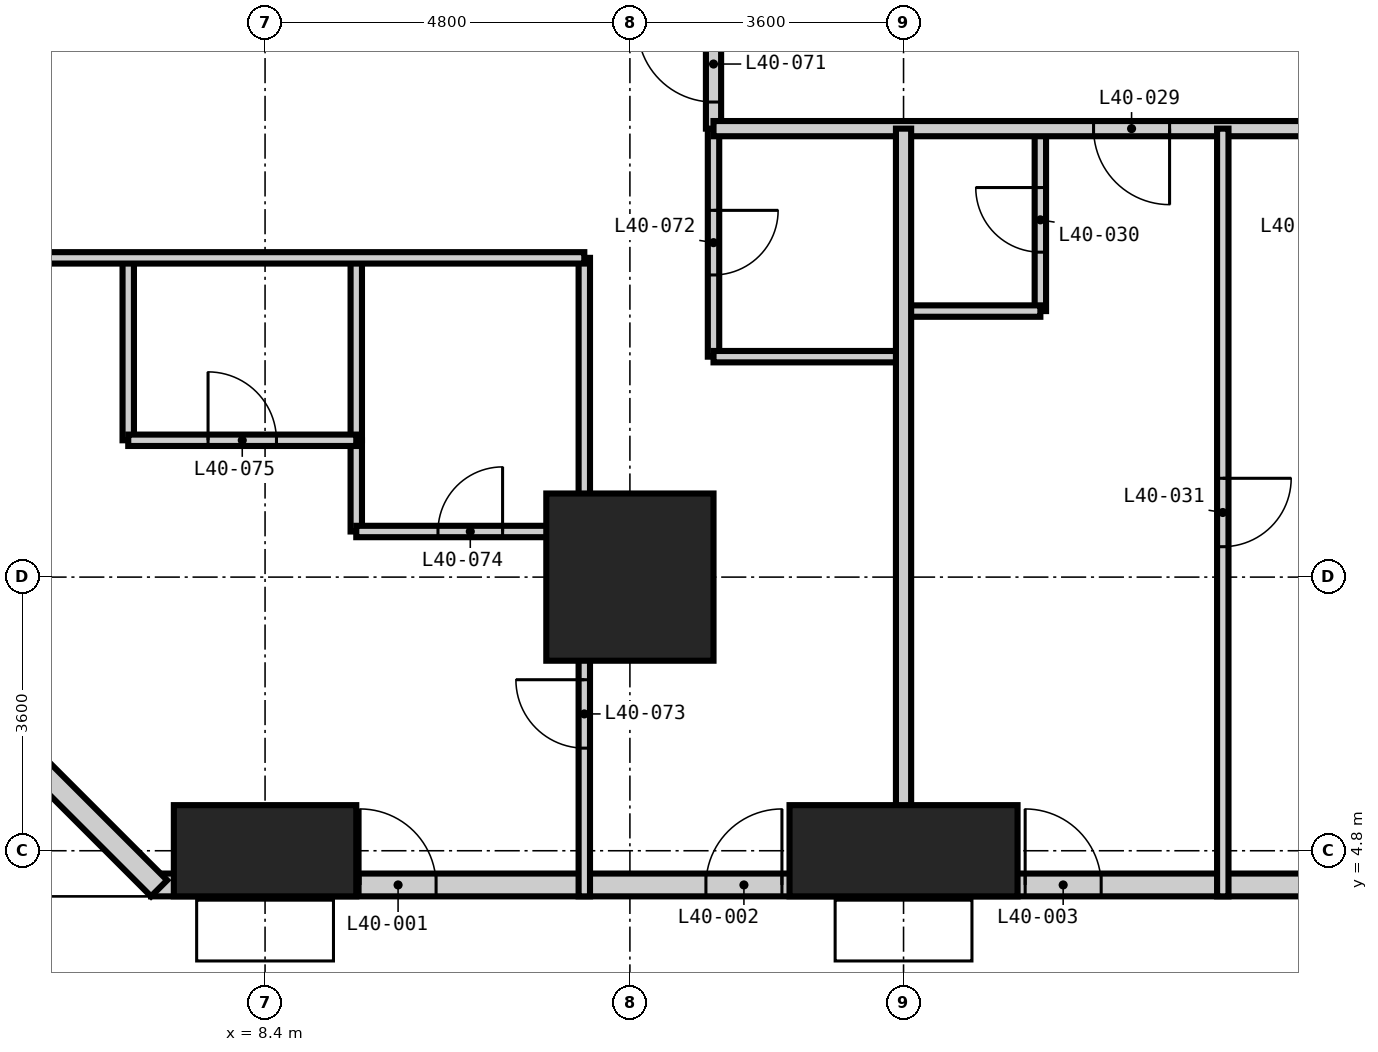
"""IFC4 building model, lengths in metres.
Left out: names, types, materials, properties, quantities, classifications, styles, units other than length and angle.
Written with IfcOpenShell. Run it as: python <this file> out.ifc"""

import sys

from ifc_helpers import new_model, si_unit, direction, frame, frame_2d, origin, origin_2d, place, context, subcontext, project, spatial, rectangle, extrude, element, fill, save


model = new_model("IFC4")
c1 = context("Model", 3, precision=1e-05, world=origin(), true_north=direction((0.0, 1.0)))
c2 = subcontext(c1, "Body", "Model", "MODEL_VIEW")
j1 = project(units=[si_unit("LENGTHUNIT", "METRE"), si_unit("PLANEANGLEUNIT", "RADIAN")], contexts=[c1])
p1 = place(None, origin())
s1 = spatial("IfcSite", under=j1, at=p1, CompositionType="ELEMENT")
p2 = place(p1, origin())
s2 = spatial("IfcBuilding", under=s1, at=p2, CompositionType="ELEMENT")
p3 = place(p2, frame((0.0, 0.0, 159.0)))
s3 = spatial("IfcBuildingStorey", under=s2, at=p3, CompositionType="ELEMENT", Elevation=159.0)
p4 = place(p3, frame((8.4, 4.8, -0.35), z_axis=(0.0, 0.0, 1.0), x_axis=(1.0, 0.0, 0.0)))
e1 = element("IfcColumn", 1, at=p4, inside=s3, PredefinedType="COLUMN", context=c2, shape_type="SweptSolid", body=[
    extrude(rectangle(XDim=2.4, YDim=1.2, at=origin_2d()), origin(), (0.0, 0.0, 1.0), 3.6),
])
p5 = place(p3, frame((13.2, 8.4, -0.35), z_axis=(0.0, 0.0, 1.0), x_axis=(1.0, 0.0, 0.0)))
e2 = element("IfcColumn", 2, at=p5, inside=s3, PredefinedType="COLUMN", context=c2, shape_type="SweptSolid", body=[
    extrude(rectangle(XDim=2.2, YDim=2.2, at=origin_2d()), origin(), (0.0, 0.0, 1.0), 3.6),
])
p6 = place(p3, frame((16.8, 4.8, -0.35), z_axis=(0.0, 0.0, 1.0), x_axis=(1.0, 0.0, 0.0)))
e3 = element("IfcColumn", 3, at=p6, inside=s3, PredefinedType="COLUMN", context=c2, shape_type="SweptSolid", body=[
    extrude(rectangle(XDim=3.0, YDim=1.2, at=origin_2d()), origin(), (0.0, 0.0, 1.0), 3.6),
])
p7 = place(p3, frame((6.9, 4.35, 0.0), z_axis=(0.0, 0.0, 1.0), x_axis=(1.0, 0.0, 0.0)))
e4 = element("IfcWall", 4, at=p7, inside=s3, PredefinedType="SOLIDWALL", context=c2, shape_type="SweptSolid", body=[
    extrude(rectangle(XDim=45.0, YDim=0.3, at=frame_2d((22.5, 0.0))), origin(), (0.0, 0.0, 1.0), 3.25),
])
p8 = place(p7, frame((2.75, 0.0, 0.0)))
e5 = element("IfcOpeningElement", 5, at=p8, cuts=e4, PredefinedType="OPENING", context=c2, shape_type="SweptSolid", body=[
    extrude(rectangle(XDim=1.0, YDim=2.4, at=frame_2d((0.5, 1.2))), frame((0.0, 0.16, 0.0), z_axis=(0.0, -1.0, 0.0), x_axis=(1.0, 0.0, 0.0)), (0.0, 0.0, 1.0), 0.32),
])
p9 = place(p7, frame((7.3, 0.0, 0.0)))
e6 = element("IfcOpeningElement", 6, at=p9, cuts=e4, PredefinedType="OPENING", context=c2, shape_type="SweptSolid", body=[
    extrude(rectangle(XDim=1.0, YDim=2.4, at=frame_2d((0.5, 1.2))), frame((0.0, 0.16, 0.0), z_axis=(0.0, -1.0, 0.0), x_axis=(1.0, 0.0, 0.0)), (0.0, 0.0, 1.0), 0.32),
])
p10 = place(p7, frame((11.5, 0.0, 0.0)))
e7 = element("IfcOpeningElement", 7, at=p10, cuts=e4, PredefinedType="OPENING", context=c2, shape_type="SweptSolid", body=[
    extrude(rectangle(XDim=1.0, YDim=2.4, at=frame_2d((0.5, 1.2))), frame((0.0, 0.16, 0.0), z_axis=(0.0, -1.0, 0.0), x_axis=(1.0, 0.0, 0.0)), (0.0, 0.0, 1.0), 0.32),
])
p11 = place(p7, frame((15.7, 0.0, 0.0)))
e8 = element("IfcOpeningElement", 8, at=p11, cuts=e4, PredefinedType="OPENING", context=c2, shape_type="SweptSolid", body=[
    extrude(rectangle(XDim=1.0, YDim=2.4, at=frame_2d((0.5, 1.2))), frame((0.0, 0.16, 0.0), z_axis=(0.0, -1.0, 0.0), x_axis=(1.0, 0.0, 0.0)), (0.0, 0.0, 1.0), 0.32),
])
p12 = place(p7, frame((19.9, 0.0, 0.0)))
e9 = element("IfcOpeningElement", 9, at=p12, cuts=e4, PredefinedType="OPENING", context=c2, shape_type="SweptSolid", body=[
    extrude(rectangle(XDim=1.0, YDim=2.4, at=frame_2d((0.5, 1.2))), frame((0.0, 0.16, 0.0), z_axis=(0.0, -1.0, 0.0), x_axis=(1.0, 0.0, 0.0)), (0.0, 0.0, 1.0), 0.32),
])
p13 = place(p7, frame((24.1, 0.0, 0.0)))
e10 = element("IfcOpeningElement", 10, at=p13, cuts=e4, PredefinedType="OPENING", context=c2, shape_type="SweptSolid", body=[
    extrude(rectangle(XDim=1.0, YDim=2.4, at=frame_2d((0.5, 1.2))), frame((0.0, 0.16, 0.0), z_axis=(0.0, -1.0, 0.0), x_axis=(1.0, 0.0, 0.0)), (0.0, 0.0, 1.0), 0.32),
])
p14 = place(p7, frame((28.3, 0.0, 0.0)))
e11 = element("IfcOpeningElement", 11, at=p14, cuts=e4, PredefinedType="OPENING", context=c2, shape_type="SweptSolid", body=[
    extrude(rectangle(XDim=1.0, YDim=2.4, at=frame_2d((0.5, 1.2))), frame((0.0, 0.16, 0.0), z_axis=(0.0, -1.0, 0.0), x_axis=(1.0, 0.0, 0.0)), (0.0, 0.0, 1.0), 0.32),
])
p15 = place(p7, frame((32.5, 0.0, 0.0)))
e12 = element("IfcOpeningElement", 12, at=p15, cuts=e4, PredefinedType="OPENING", context=c2, shape_type="SweptSolid", body=[
    extrude(rectangle(XDim=1.0, YDim=2.4, at=frame_2d((0.5, 1.2))), frame((0.0, 0.16, 0.0), z_axis=(0.0, -1.0, 0.0), x_axis=(1.0, 0.0, 0.0)), (0.0, 0.0, 1.0), 0.32),
])
p16 = place(p7, frame((36.7, 0.0, 0.0)))
e13 = element("IfcOpeningElement", 13, at=p16, cuts=e4, PredefinedType="OPENING", context=c2, shape_type="SweptSolid", body=[
    extrude(rectangle(XDim=1.0, YDim=2.4, at=frame_2d((0.5, 1.2))), frame((0.0, 0.16, 0.0), z_axis=(0.0, -1.0, 0.0), x_axis=(1.0, 0.0, 0.0)), (0.0, 0.0, 1.0), 0.32),
])
p17 = place(p7, frame((41.25, 0.0, 0.0)))
e14 = element("IfcOpeningElement", 14, at=p17, cuts=e4, PredefinedType="OPENING", context=c2, shape_type="SweptSolid", body=[
    extrude(rectangle(XDim=1.0, YDim=2.4, at=frame_2d((0.5, 1.2))), frame((0.0, 0.16, 0.0), z_axis=(0.0, -1.0, 0.0), x_axis=(1.0, 0.0, 0.0)), (0.0, 0.0, 1.0), 0.32),
])
p18 = place(p3, frame((4.306, 7.006, 0.0), z_axis=(0.0, 0.0, 1.0), x_axis=(0.707106781187, -0.707106781187, 0.0)))
e15 = element("IfcWall", 15, at=p18, inside=s3, PredefinedType="SOLIDWALL", context=c2, shape_type="SweptSolid", body=[
    extrude(rectangle(XDim=3.819, YDim=0.3, at=frame_2d((1.909, 0.0))), origin(), (0.0, 0.0, 1.0), 3.25),
])
p19 = place(p3, frame((9.6, 9.0, 0.0), z_axis=(0.0, 0.0, 1.0), x_axis=(0.0, 1.0, 0.0)))
e16 = element("IfcWall", 16, at=p19, inside=s3, PredefinedType="PARTITIONING", context=c2, shape_type="SweptSolid", body=[
    extrude(rectangle(XDim=1.2, YDim=0.15, at=frame_2d((0.6, 0.0))), origin(), (0.0, 0.0, 1.0), 3.25),
])
p20 = place(p3, frame((14.3, 11.3, 0.0), z_axis=(0.0, 0.0, 1.0), x_axis=(0.0, 1.0, 0.0)))
e17 = element("IfcWall", 17, at=p20, inside=s3, PredefinedType="PARTITIONING", context=c2, shape_type="SweptSolid", body=[
    extrude(rectangle(XDim=3.0, YDim=0.15, at=frame_2d((1.5, 0.0))), origin(), (0.0, 0.0, 1.0), 3.25),
])
p21 = place(p20, frame((1.075, 0.0, 0.0)))
e18 = element("IfcOpeningElement", 18, at=p21, cuts=e17, PredefinedType="OPENING", context=c2, shape_type="SweptSolid", body=[
    extrude(rectangle(XDim=0.85, YDim=2.1, at=frame_2d((0.425, 1.05))), frame((0.0, 0.085, 0.0), z_axis=(0.0, -1.0, 0.0), x_axis=(1.0, 0.0, 0.0)), (0.0, 0.0, 1.0), 0.17),
])
p22 = place(p3, frame((18.6, 11.9, 0.0), z_axis=(0.0, 0.0, 1.0), x_axis=(0.0, 1.0, 0.0)))
e19 = element("IfcWall", 19, at=p22, inside=s3, PredefinedType="PARTITIONING", context=c2, shape_type="SweptSolid", body=[
    extrude(rectangle(XDim=2.4, YDim=0.15, at=frame_2d((1.2, 0.0))), origin(), (0.0, 0.0, 1.0), 3.25),
])
p23 = place(p22, frame((0.775, 0.0, 0.0)))
e20 = element("IfcOpeningElement", 20, at=p23, cuts=e19, PredefinedType="OPENING", context=c2, shape_type="SweptSolid", body=[
    extrude(rectangle(XDim=0.85, YDim=2.1, at=frame_2d((0.425, 1.05))), frame((0.0, 0.085, 0.0), z_axis=(0.0, -1.0, 0.0), x_axis=(1.0, 0.0, 0.0)), (0.0, 0.0, 1.0), 0.17),
])
p24 = place(p3, frame((9.6, 9.0, 0.0), z_axis=(0.0, 0.0, 1.0), x_axis=(1.0, 0.0, 0.0)))
e21 = element("IfcWall", 21, at=p24, inside=s3, PredefinedType="PARTITIONING", context=c2, shape_type="SweptSolid", body=[
    extrude(rectangle(XDim=3.0, YDim=0.15, at=frame_2d((1.5, 0.0))), origin(), (0.0, 0.0, 1.0), 3.25),
])
p25 = place(p24, frame((1.075, 0.0, 0.0)))
e22 = element("IfcOpeningElement", 22, at=p25, cuts=e21, PredefinedType="OPENING", context=c2, shape_type="SweptSolid", body=[
    extrude(rectangle(XDim=0.85, YDim=2.1, at=frame_2d((0.425, 1.05))), frame((0.0, 0.085, 0.0), z_axis=(0.0, -1.0, 0.0), x_axis=(1.0, 0.0, 0.0)), (0.0, 0.0, 1.0), 0.17),
])
p26 = place(p3, frame((14.3, 11.3, 0.0), z_axis=(0.0, 0.0, 1.0), x_axis=(1.0, 0.0, 0.0)))
e23 = element("IfcWall", 23, at=p26, inside=s3, PredefinedType="PARTITIONING", context=c2, shape_type="SweptSolid", body=[
    extrude(rectangle(XDim=2.5, YDim=0.15, at=frame_2d((1.25, 0.0))), origin(), (0.0, 0.0, 1.0), 3.25),
])
p27 = place(p3, frame((16.8, 11.9, 0.0), z_axis=(0.0, 0.0, 1.0), x_axis=(1.0, 0.0, 0.0)))
e24 = element("IfcWall", 24, at=p27, inside=s3, PredefinedType="PARTITIONING", context=c2, shape_type="SweptSolid", body=[
    extrude(rectangle(XDim=1.8, YDim=0.15, at=frame_2d((0.9, 0.0))), origin(), (0.0, 0.0, 1.0), 3.25),
])
p28 = place(p3, frame((14.3, 14.3, 0.0), z_axis=(0.0, 0.0, 1.0), x_axis=(0.0, 1.0, 0.0)))
e25 = element("IfcWall", 25, at=p28, inside=s3, PredefinedType="PARTITIONING", context=c2, shape_type="SweptSolid", body=[
    extrude(rectangle(XDim=31.4, YDim=0.2, at=frame_2d((15.7, 0.0))), origin(), (0.0, 0.0, 1.0), 3.25),
])
p29 = place(p28, frame((8.3, 0.0, 0.0)))
e26 = element("IfcOpeningElement", 26, at=p29, cuts=e25, PredefinedType="OPENING", context=c2, shape_type="SweptSolid", body=[
    extrude(rectangle(XDim=1.0, YDim=2.2, at=frame_2d((0.5, 1.1))), frame((0.0, 0.11, 0.0), z_axis=(0.0, -1.0, 0.0), x_axis=(1.0, 0.0, 0.0)), (0.0, 0.0, 1.0), 0.22),
])
p30 = place(p28, frame((20.9, 0.0, 0.0)))
e27 = element("IfcOpeningElement", 27, at=p30, cuts=e25, PredefinedType="OPENING", context=c2, shape_type="SweptSolid", body=[
    extrude(rectangle(XDim=1.0, YDim=2.2, at=frame_2d((0.5, 1.1))), frame((0.0, 0.11, 0.0), z_axis=(0.0, -1.0, 0.0), x_axis=(1.0, 0.0, 0.0)), (0.0, 0.0, 1.0), 0.22),
])
p31 = place(p28, frame((0.35, 0.0, 0.0)))
e28 = element("IfcOpeningElement", 28, at=p31, cuts=e25, PredefinedType="OPENING", context=c2, shape_type="SweptSolid", body=[
    extrude(rectangle(XDim=1.0, YDim=2.2, at=frame_2d((0.5, 1.1))), frame((0.0, 0.11, 0.0), z_axis=(0.0, -1.0, 0.0), x_axis=(1.0, 0.0, 0.0)), (0.0, 0.0, 1.0), 0.22),
])
p32 = place(p28, frame((29.05, 0.0, 0.0)))
e29 = element("IfcOpeningElement", 29, at=p32, cuts=e25, PredefinedType="OPENING", context=c2, shape_type="SweptSolid", body=[
    extrude(rectangle(XDim=1.0, YDim=2.2, at=frame_2d((0.5, 1.1))), frame((0.0, 0.11, 0.0), z_axis=(0.0, -1.0, 0.0), x_axis=(1.0, 0.0, 0.0)), (0.0, 0.0, 1.0), 0.22),
])
p33 = place(p3, frame((45.1, 14.3, 0.0), z_axis=(0.0, 0.0, 1.0), x_axis=(-1.0, 0.0, 0.0)))
e30 = element("IfcWall", 30, at=p33, inside=s3, PredefinedType="PARTITIONING", context=c2, shape_type="SweptSolid", body=[
    extrude(rectangle(XDim=30.8, YDim=0.2, at=frame_2d((15.4, 0.0))), origin(), (0.0, 0.0, 1.0), 3.25),
])
p34 = place(p33, frame((24.8, 0.0, 0.0)))
e31 = element("IfcOpeningElement", 31, at=p34, cuts=e30, PredefinedType="OPENING", context=c2, shape_type="SweptSolid", body=[
    extrude(rectangle(XDim=1.0, YDim=2.2, at=frame_2d((0.5, 1.1))), frame((0.0, 0.11, 0.0), z_axis=(0.0, -1.0, 0.0), x_axis=(1.0, 0.0, 0.0)), (0.0, 0.0, 1.0), 0.22),
])
p35 = place(p33, frame((14.0, 0.0, 0.0)))
e32 = element("IfcOpeningElement", 32, at=p35, cuts=e30, PredefinedType="OPENING", context=c2, shape_type="SweptSolid", body=[
    extrude(rectangle(XDim=1.0, YDim=2.2, at=frame_2d((0.5, 1.1))), frame((0.0, 0.11, 0.0), z_axis=(0.0, -1.0, 0.0), x_axis=(1.0, 0.0, 0.0)), (0.0, 0.0, 1.0), 0.22),
])
p36 = place(p33, frame((8.0, 0.0, 0.0)))
e33 = element("IfcOpeningElement", 33, at=p36, cuts=e30, PredefinedType="OPENING", context=c2, shape_type="SweptSolid", body=[
    extrude(rectangle(XDim=1.0, YDim=2.2, at=frame_2d((0.5, 1.1))), frame((0.0, 0.11, 0.0), z_axis=(0.0, -1.0, 0.0), x_axis=(1.0, 0.0, 0.0)), (0.0, 0.0, 1.0), 0.22),
])
p37 = place(p3, frame((16.8, 4.2, 0.0), z_axis=(0.0, 0.0, 1.0), x_axis=(0.0, 1.0, 0.0)))
e34 = element("IfcWall", 34, at=p37, inside=s3, PredefinedType="PARTITIONING", context=c2, shape_type="SweptSolid", body=[
    extrude(rectangle(XDim=10.1, YDim=0.2, at=frame_2d((5.05, 0.0))), origin(), (0.0, 0.0, 1.0), 3.25),
])
for number, where, z_axis, x_axis in (
    (35, (6.6, 10.2, 0.0), (0.0, 0.0, 1.0), (0.0, 1.0, 0.0)),
    (36, (9.6, 10.2, 0.0), (0.0, 0.0, 1.0), (0.0, 1.0, 0.0)),
):
    element("IfcWall", number, at=place(p3, frame(where, z_axis=z_axis, x_axis=x_axis)), inside=s3, PredefinedType="PARTITIONING", context=c2, shape_type="SweptSolid", body=[
        extrude(rectangle(XDim=2.4, YDim=0.15, at=frame_2d((1.2, 0.0))), origin(), (0.0, 0.0, 1.0), 3.25),
    ])
p38 = place(p3, frame((12.6, 4.2, 0.0), z_axis=(0.0, 0.0, 1.0), x_axis=(0.0, 1.0, 0.0)))
e37 = element("IfcWall", 37, at=p38, inside=s3, PredefinedType="PARTITIONING", context=c2, shape_type="SweptSolid", body=[
    extrude(rectangle(XDim=8.4, YDim=0.15, at=frame_2d((4.2, 0.0))), origin(), (0.0, 0.0, 1.0), 3.25),
])
p39 = place(p38, frame((1.95, 0.0, 0.0)))
e38 = element("IfcOpeningElement", 38, at=p39, cuts=e37, PredefinedType="OPENING", context=c2, shape_type="SweptSolid", body=[
    extrude(rectangle(XDim=0.9, YDim=2.1, at=frame_2d((0.45, 1.05))), frame((0.0, 0.085, 0.0), z_axis=(0.0, -1.0, 0.0), x_axis=(1.0, 0.0, 0.0)), (0.0, 0.0, 1.0), 0.17),
])
p40 = place(p3, frame((21.0, 4.2, 0.0), z_axis=(0.0, 0.0, 1.0), x_axis=(0.0, 1.0, 0.0)))
e39 = element("IfcWall", 39, at=p40, inside=s3, PredefinedType="PARTITIONING", context=c2, shape_type="SweptSolid", body=[
    extrude(rectangle(XDim=10.1, YDim=0.15, at=frame_2d((5.05, 0.0))), origin(), (0.0, 0.0, 1.0), 3.25),
])
p41 = place(p40, frame((4.6, 0.0, 0.0)))
e40 = element("IfcOpeningElement", 40, at=p41, cuts=e39, PredefinedType="OPENING", context=c2, shape_type="SweptSolid", body=[
    extrude(rectangle(XDim=0.9, YDim=2.1, at=frame_2d((0.45, 1.05))), frame((0.0, 0.085, 0.0), z_axis=(0.0, -1.0, 0.0), x_axis=(1.0, 0.0, 0.0)), (0.0, 0.0, 1.0), 0.17),
])
p42 = place(p3, frame((6.6, 10.2, 0.0), z_axis=(0.0, 0.0, 1.0), x_axis=(1.0, 0.0, 0.0)))
e41 = element("IfcWall", 41, at=p42, inside=s3, PredefinedType="PARTITIONING", context=c2, shape_type="SweptSolid", body=[
    extrude(rectangle(XDim=3.0, YDim=0.15, at=frame_2d((1.5, 0.0))), origin(), (0.0, 0.0, 1.0), 3.25),
])
p43 = place(p42, frame((1.05, 0.0, 0.0)))
e42 = element("IfcOpeningElement", 42, at=p43, cuts=e41, PredefinedType="OPENING", context=c2, shape_type="SweptSolid", body=[
    extrude(rectangle(XDim=0.9, YDim=2.1, at=frame_2d((0.45, 1.05))), frame((0.0, 0.085, 0.0), z_axis=(0.0, -1.0, 0.0), x_axis=(1.0, 0.0, 0.0)), (0.0, 0.0, 1.0), 0.17),
])
p44 = place(p3, frame((4.2, 12.6, 0.0), z_axis=(0.0, 0.0, 1.0), x_axis=(1.0, 0.0, 0.0)))
e43 = element("IfcWall", 43, at=p44, inside=s3, PredefinedType="PARTITIONING", context=c2, shape_type="SweptSolid", body=[
    extrude(rectangle(XDim=8.4, YDim=0.15, at=frame_2d((4.2, 0.0))), origin(), (0.0, 0.0, 1.0), 3.25),
])
p45 = place(p8, origin())
e44 = element("IfcDoor", 44, at=p45, inside=s3, OperationType="SINGLE_SWING_LEFT", PredefinedType="DOOR", context=c2, shape_type="SweptSolid", body=[
    extrude(rectangle(XDim=1.0, YDim=2.4, at=frame_2d((0.5, 1.2))), frame((0.0, 0.025, 0.0), z_axis=(0.0, -1.0, 0.0), x_axis=(1.0, 0.0, 0.0)), (0.0, 0.0, 1.0), 0.05),
])
fill(e5, e44)
p46 = place(p9, origin())
e45 = element("IfcDoor", 45, at=p46, inside=s3, OperationType="SINGLE_SWING_RIGHT", PredefinedType="DOOR", context=c2, shape_type="SweptSolid", body=[
    extrude(rectangle(XDim=1.0, YDim=2.4, at=frame_2d((0.5, 1.2))), frame((0.0, 0.025, 0.0), z_axis=(0.0, -1.0, 0.0), x_axis=(1.0, 0.0, 0.0)), (0.0, 0.0, 1.0), 0.05),
])
fill(e6, e45)
p47 = place(p10, origin())
e46 = element("IfcDoor", 46, at=p47, inside=s3, OperationType="SINGLE_SWING_LEFT", PredefinedType="DOOR", context=c2, shape_type="SweptSolid", body=[
    extrude(rectangle(XDim=1.0, YDim=2.4, at=frame_2d((0.5, 1.2))), frame((0.0, 0.025, 0.0), z_axis=(0.0, -1.0, 0.0), x_axis=(1.0, 0.0, 0.0)), (0.0, 0.0, 1.0), 0.05),
])
fill(e7, e46)
p48 = place(p34, origin())
e47 = element("IfcDoor", 47, at=p48, inside=s3, OperationType="SINGLE_SWING_LEFT", PredefinedType="DOOR", context=c2, shape_type="SweptSolid", body=[
    extrude(rectangle(XDim=1.0, YDim=2.2, at=frame_2d((0.5, 1.1))), frame((0.0, 0.025, 0.0), z_axis=(0.0, -1.0, 0.0), x_axis=(1.0, 0.0, 0.0)), (0.0, 0.0, 1.0), 0.05),
])
fill(e31, e47)
p49 = place(p23, origin())
e48 = element("IfcDoor", 48, at=p49, inside=s3, OperationType="SINGLE_SWING_RIGHT", PredefinedType="DOOR", context=c2, shape_type="SweptSolid", body=[
    extrude(rectangle(XDim=0.85, YDim=2.1, at=frame_2d((0.425, 1.05))), frame((0.0, 0.025, 0.0), z_axis=(0.0, -1.0, 0.0), x_axis=(1.0, 0.0, 0.0)), (0.0, 0.0, 1.0), 0.05),
])
fill(e20, e48)
p50 = place(p41, frame((0.9, 0.0, 0.0), z_axis=(0.0, 0.0, 1.0), x_axis=(-1.0, 0.0, 0.0)))
e49 = element("IfcDoor", 49, at=p50, inside=s3, OperationType="SINGLE_SWING_LEFT", PredefinedType="DOOR", context=c2, shape_type="SweptSolid", body=[
    extrude(rectangle(XDim=0.9, YDim=2.1, at=frame_2d((0.45, 1.05))), frame((0.0, 0.025, 0.0), z_axis=(0.0, -1.0, 0.0), x_axis=(1.0, 0.0, 0.0)), (0.0, 0.0, 1.0), 0.05),
])
fill(e40, e49)
p51 = place(p31, origin())
e50 = element("IfcDoor", 50, at=p51, inside=s3, OperationType="SINGLE_SWING_RIGHT", PredefinedType="DOOR", context=c2, shape_type="SweptSolid", body=[
    extrude(rectangle(XDim=1.0, YDim=2.2, at=frame_2d((0.5, 1.1))), frame((0.0, 0.025, 0.0), z_axis=(0.0, -1.0, 0.0), x_axis=(1.0, 0.0, 0.0)), (0.0, 0.0, 1.0), 0.05),
])
fill(e28, e50)
p52 = place(p21, frame((0.85, 0.0, 0.0), z_axis=(0.0, 0.0, 1.0), x_axis=(-1.0, 0.0, 0.0)))
e51 = element("IfcDoor", 51, at=p52, inside=s3, OperationType="SINGLE_SWING_LEFT", PredefinedType="DOOR", context=c2, shape_type="SweptSolid", body=[
    extrude(rectangle(XDim=0.85, YDim=2.1, at=frame_2d((0.425, 1.05))), frame((0.0, 0.025, 0.0), z_axis=(0.0, -1.0, 0.0), x_axis=(1.0, 0.0, 0.0)), (0.0, 0.0, 1.0), 0.05),
])
fill(e18, e51)
p53 = place(p39, origin())
e52 = element("IfcDoor", 52, at=p53, inside=s3, OperationType="SINGLE_SWING_RIGHT", PredefinedType="DOOR", context=c2, shape_type="SweptSolid", body=[
    extrude(rectangle(XDim=0.9, YDim=2.1, at=frame_2d((0.45, 1.05))), frame((0.0, 0.025, 0.0), z_axis=(0.0, -1.0, 0.0), x_axis=(1.0, 0.0, 0.0)), (0.0, 0.0, 1.0), 0.05),
])
fill(e38, e52)
p54 = place(p25, origin())
e53 = element("IfcDoor", 53, at=p54, inside=s3, OperationType="SINGLE_SWING_RIGHT", PredefinedType="DOOR", context=c2, shape_type="SweptSolid", body=[
    extrude(rectangle(XDim=0.85, YDim=2.1, at=frame_2d((0.425, 1.05))), frame((0.0, 0.025, 0.0), z_axis=(0.0, -1.0, 0.0), x_axis=(1.0, 0.0, 0.0)), (0.0, 0.0, 1.0), 0.05),
])
fill(e22, e53)
p55 = place(p43, origin())
e54 = element("IfcDoor", 54, at=p55, inside=s3, OperationType="SINGLE_SWING_LEFT", PredefinedType="DOOR", context=c2, shape_type="SweptSolid", body=[
    extrude(rectangle(XDim=0.9, YDim=2.1, at=frame_2d((0.45, 1.05))), frame((0.0, 0.025, 0.0), z_axis=(0.0, -1.0, 0.0), x_axis=(1.0, 0.0, 0.0)), (0.0, 0.0, 1.0), 0.05),
])
fill(e42, e54)
save(model, sys.argv[1])
